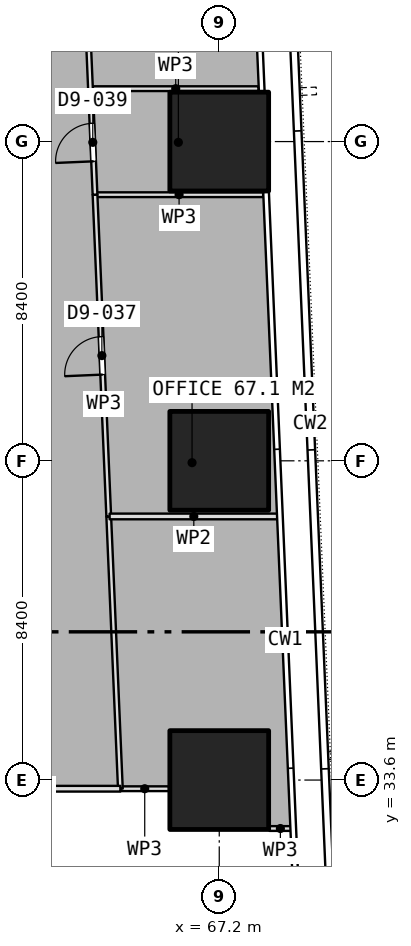
"""IFC4 building model, lengths in metres.
Left out: names, types, materials, properties, quantities, classifications, styles, units other than length and angle.
Written with IfcOpenShell. Run it as: python <this file> out.ifc"""

import sys

from ifc_helpers import new_model, si_unit, direction, frame, frame_2d, origin, origin_2d, place, context, subcontext, project, spatial, rectangle, extrude, element, fill, save


model = new_model("IFC4")
c1 = context("Model", 3, precision=1e-05, world=origin(), true_north=direction((0.0, 1.0)))
c2 = subcontext(c1, "Body", "Model", "MODEL_VIEW")
j1 = project(units=[si_unit("LENGTHUNIT", "METRE"), si_unit("PLANEANGLEUNIT", "RADIAN")], contexts=[c1])
p1 = place(None, origin())
s1 = spatial("IfcSite", under=j1, at=p1, CompositionType="ELEMENT")
p2 = place(p1, origin())
s2 = spatial("IfcBuilding", under=s1, at=p2, CompositionType="ELEMENT")
p3 = place(p2, frame((0.0, 0.0, 29.15)))
s3 = spatial("IfcBuildingStorey", under=s2, at=p3, CompositionType="ELEMENT", Elevation=29.15)
for number, where, z_axis, x_axis in (
    (1, (67.2, 33.6, 0.0), (0.0, 0.0, 1.0), (1.0, 0.0, 0.0)),
    (2, (67.2, 42.0, 0.0), (0.0, 0.0, 1.0), (1.0, 0.0, 0.0)),
    (3, (67.2, 50.4, 0.0), (0.0, 0.0, 1.0), (1.0, 0.0, 0.0)),
):
    element("IfcColumn", number, at=place(p3, frame(where, z_axis=z_axis, x_axis=x_axis)), inside=s3, PredefinedType="COLUMN", context=c2, shape_type="SweptSolid", body=[
        extrude(rectangle(XDim=2.6, YDim=2.6, at=origin_2d()), origin(), (0.0, 0.0, 1.0), 3.75),
    ])
p4 = place(p3, frame((63.931, 49.002, 0.0), z_axis=(0.0, 0.0, 1.0), x_axis=(1.0, 0.0, 0.0)))
e4 = element("IfcWall", 4, at=p4, inside=s3, PredefinedType="PARTITIONING", context=c2, shape_type="SweptSolid", body=[
    extrude(rectangle(XDim=4.424, YDim=0.125, at=frame_2d((2.212, 0.0))), origin(), (0.0, 0.0, 1.0), 3.5),
])
p5 = place(p3, frame((69.097, 32.325, 0.0), z_axis=(0.0, 0.0, 1.0), x_axis=(-1.0, 0.0, 0.0)))
e5 = element("IfcWall", 5, at=p5, inside=s3, PredefinedType="PARTITIONING", context=c2, shape_type="SweptSolid", body=[
    extrude(rectangle(XDim=0.577, YDim=0.125, at=frame_2d((0.289, 0.0))), origin(), (0.0, 0.0, 1.0), 3.5),
])
p6 = place(p3, frame((65.88, 33.372, 0.0), z_axis=(0.0, 0.0, 1.0), x_axis=(-1.0, 0.0, 0.0)))
e6 = element("IfcWall", 6, at=p6, inside=s3, PredefinedType="PARTITIONING", context=c2, shape_type="SweptSolid", body=[
    extrude(rectangle(XDim=1.282, YDim=0.125, at=frame_2d((0.641, 0.0))), origin(), (0.0, 0.0, 1.0), 3.5),
])
p7 = place(p3, frame((64.598, 33.372, 0.0), z_axis=(0.0, 0.0, 1.0), x_axis=(-0.042668763755, 0.999089273589, 0.0)))
e7 = element("IfcWall", 7, at=p7, inside=s3, PredefinedType="PARTITIONING", context=c2, shape_type="SweptSolid", body=[
    extrude(rectangle(XDim=7.169, YDim=0.125, at=frame_2d((3.585, 0.0))), origin(), (0.0, 0.0, 1.0), 3.5),
])
p8 = place(p3, frame((64.292, 40.535, 0.0), z_axis=(0.0, 0.0, 1.0), x_axis=(-0.042607102668, 0.999091905083, 0.0)))
e8 = element("IfcWall", 8, at=p8, inside=s3, PredefinedType="PARTITIONING", context=c2, shape_type="SweptSolid", body=[
    extrude(rectangle(XDim=8.475, YDim=0.125, at=frame_2d((4.237, 0.0))), origin(), (0.0, 0.0, 1.0), 3.5),
])
p9 = place(p8, frame((3.737, 0.0, 0.0)))
e9 = element("IfcOpeningElement", 9, at=p9, cuts=e8, PredefinedType="OPENING", context=c2, shape_type="SweptSolid", body=[
    extrude(rectangle(XDim=1.0, YDim=2.1, at=frame_2d((0.5, 1.05))), frame((0.0, 0.073, 0.0), z_axis=(0.0, -1.0, 0.0), x_axis=(1.0, 0.0, 0.0)), (0.0, 0.0, 1.0), 0.145),
])
p10 = place(p3, frame((63.931, 49.003, 0.0), z_axis=(0.0, 0.0, 1.0), x_axis=(-0.042791308653, 0.999084032454, 0.0)))
e10 = element("IfcWall", 10, at=p10, inside=s3, PredefinedType="PARTITIONING", context=c2, shape_type="SweptSolid", body=[
    extrude(rectangle(XDim=2.756, YDim=0.125, at=frame_2d((1.378, 0.0))), origin(), (0.0, 0.0, 1.0), 3.5),
])
p11 = place(p10, frame((0.878, 0.0, 0.0)))
e11 = element("IfcOpeningElement", 11, at=p11, cuts=e10, PredefinedType="OPENING", context=c2, shape_type="SweptSolid", body=[
    extrude(rectangle(XDim=1.0, YDim=2.1, at=frame_2d((0.5, 1.05))), frame((0.0, 0.073, 0.0), z_axis=(0.0, -1.0, 0.0), x_axis=(1.0, 0.0, 0.0)), (0.0, 0.0, 1.0), 0.145),
])
p12 = place(p3, frame((63.874, 51.792, 0.0), z_axis=(0.0, 0.0, 1.0), x_axis=(1.0, 0.0, 0.0)))
e12 = element("IfcWall", 12, at=p12, inside=s3, PredefinedType="PARTITIONING", context=c2, shape_type="SweptSolid", body=[
    extrude(rectangle(XDim=4.361, YDim=0.125, at=frame_2d((2.181, 0.0))), origin(), (0.0, 0.0, 1.0), 3.5),
])
p13 = place(p3, frame((63.813, 51.757, 0.0), z_axis=(0.0, 0.0, 1.0), x_axis=(-0.042631159687, 0.999090878861, 0.0)))
e13 = element("IfcWall", 13, at=p13, inside=s3, PredefinedType="PARTITIONING", context=c2, shape_type="SweptSolid", body=[
    extrude(rectangle(XDim=4.364, YDim=0.125, at=frame_2d((2.182, 0.0))), origin(), (0.0, 0.0, 1.0), 3.5),
])
p14 = place(p3, frame((64.315, 40.536, 0.0), z_axis=(0.0, 0.0, 1.0), x_axis=(1.0, 0.0, 0.0)))
e14 = element("IfcWall", 14, at=p14, inside=s3, PredefinedType="PARTITIONING", context=c2, shape_type="SweptSolid", body=[
    extrude(rectangle(XDim=4.431, YDim=0.15, at=frame_2d((2.216, 0.0))), origin(), (0.0, 0.0, 1.0), 3.5),
])
p15 = place(p3, frame((64.598, 33.372, 0.0), z_axis=(0.0, 0.0, 1.0), x_axis=(-1.0, 0.0, 0.0)))
e15 = element("IfcWall", 15, at=p15, inside=s3, PredefinedType="PARTITIONING", context=c2, shape_type="SweptSolid", body=[
    extrude(rectangle(XDim=4.478, YDim=0.15, at=frame_2d((2.239, 0.0))), origin(), (0.0, 0.0, 1.0), 3.5),
])
p16 = place(p9, origin())
e16 = element("IfcDoor", 16, at=p16, inside=s3, OperationType="SINGLE_SWING_LEFT", PredefinedType="DOOR", context=c2, shape_type="SweptSolid", body=[
    extrude(rectangle(XDim=1.0, YDim=2.1, at=frame_2d((0.5, 1.05))), frame((0.0, 0.025, 0.0), z_axis=(0.0, -1.0, 0.0), x_axis=(1.0, 0.0, 0.0)), (0.0, 0.0, 1.0), 0.05),
])
fill(e9, e16)
p17 = place(p11, origin())
e17 = element("IfcDoor", 17, at=p17, inside=s3, OperationType="SINGLE_SWING_LEFT", PredefinedType="DOOR", context=c2, shape_type="SweptSolid", body=[
    extrude(rectangle(XDim=1.0, YDim=2.1, at=frame_2d((0.5, 1.05))), frame((0.0, 0.025, 0.0), z_axis=(0.0, -1.0, 0.0), x_axis=(1.0, 0.0, 0.0)), (0.0, 0.0, 1.0), 0.05),
])
fill(e11, e17)
save(model, sys.argv[1])
